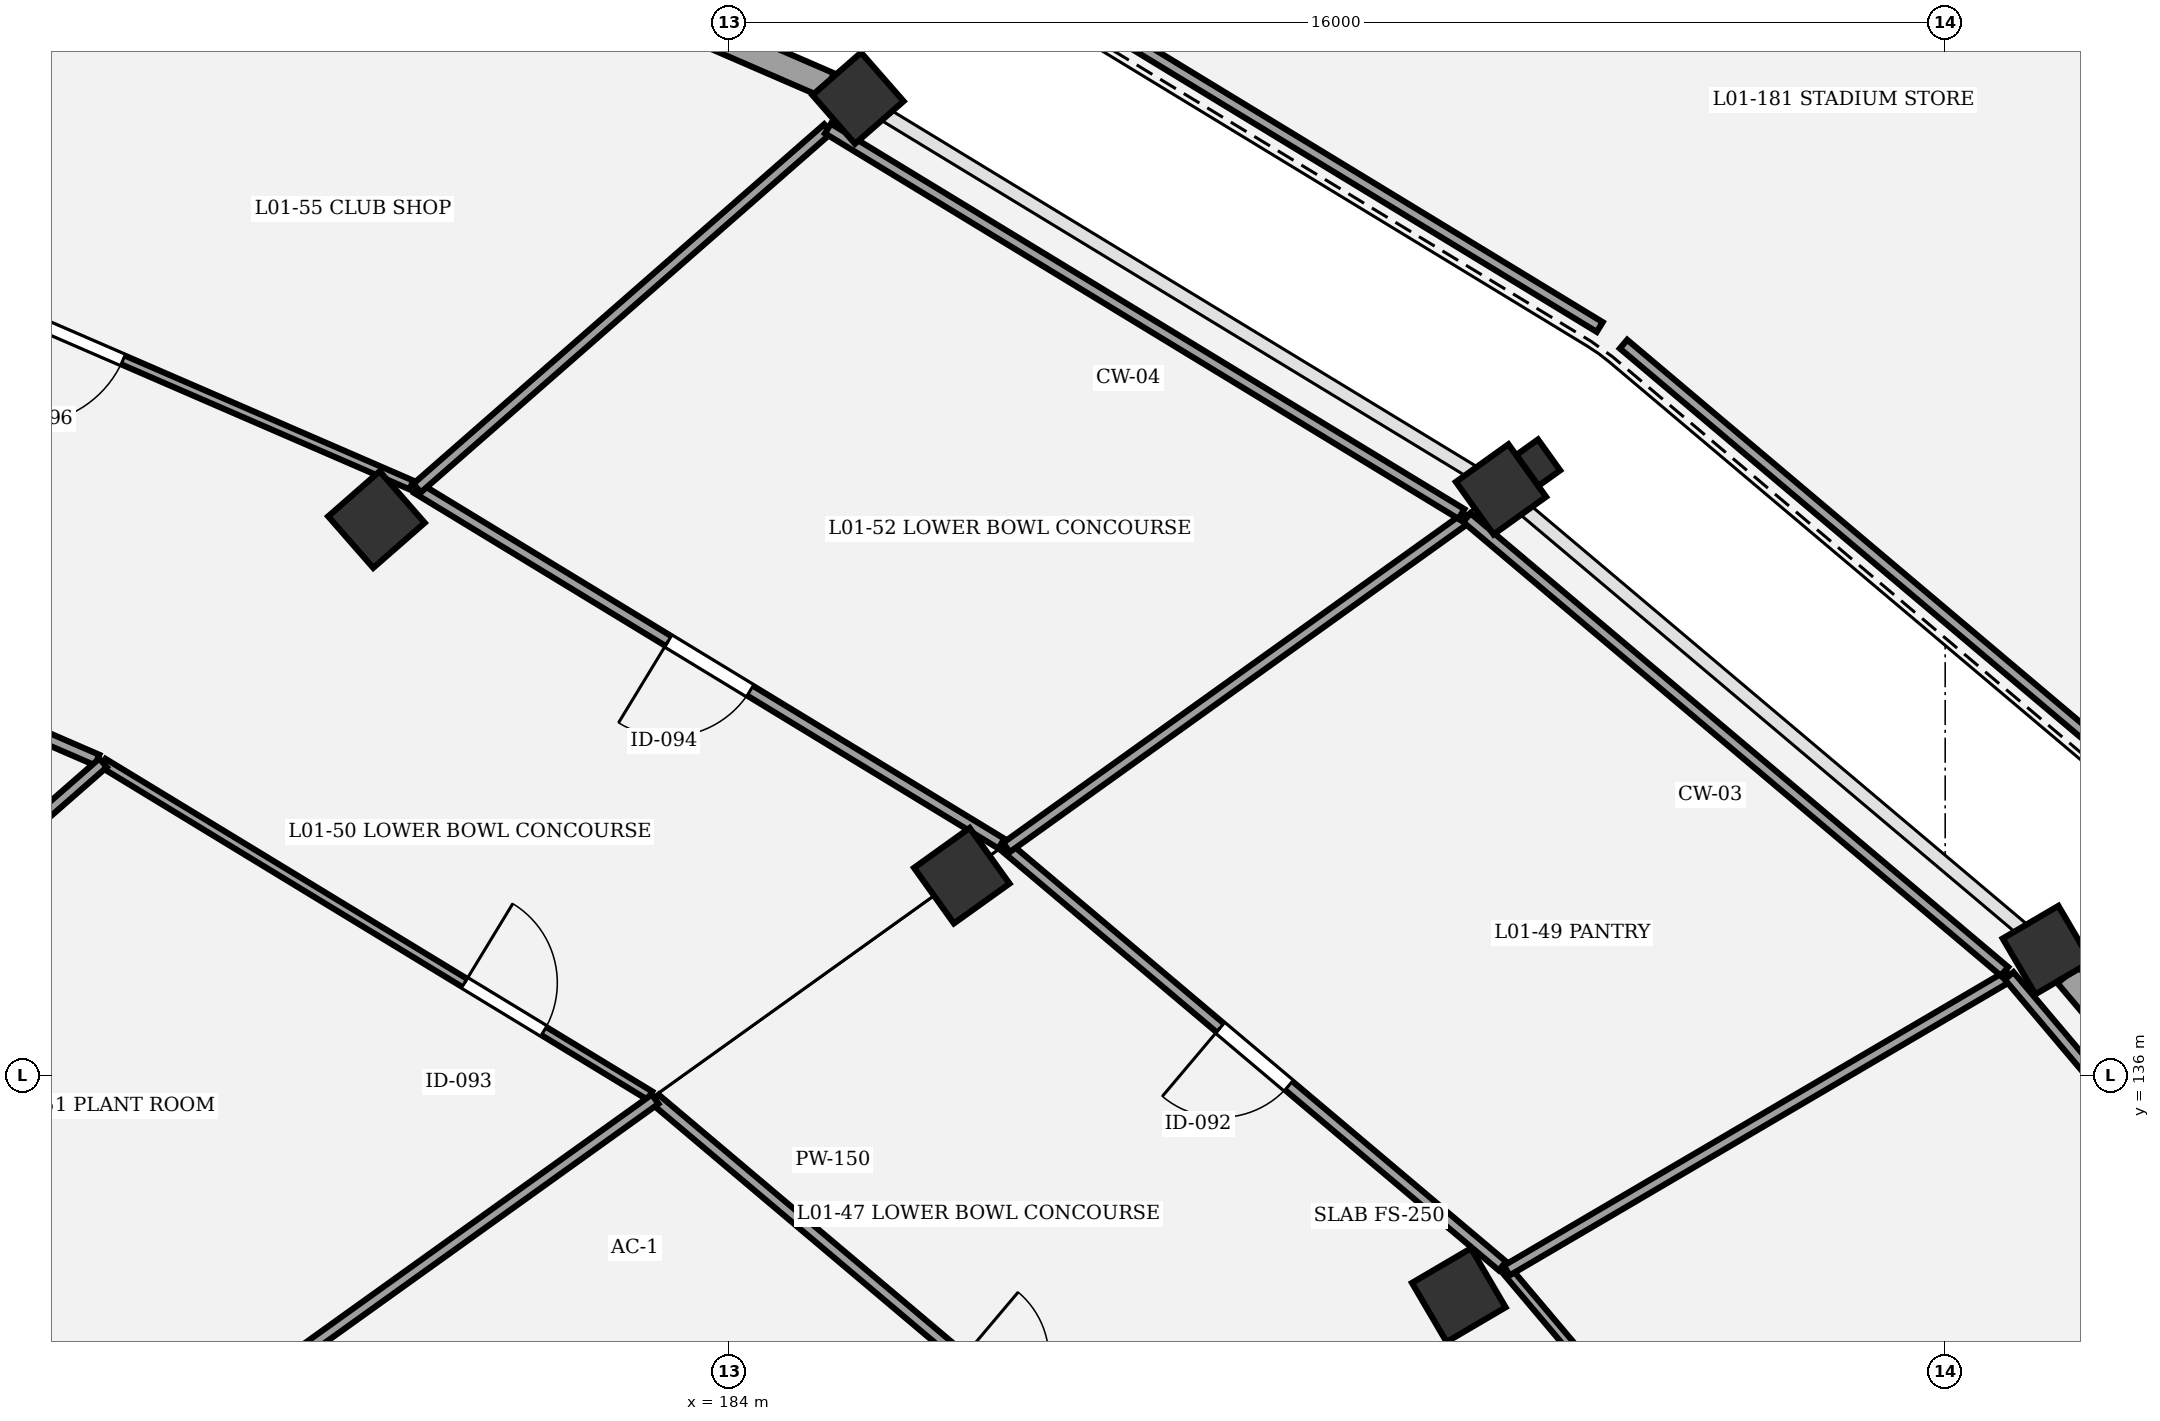
"""IFC4 building model, lengths in metres.
Left out: names, types, materials, properties, quantities, classifications, styles, units other than length and angle.
Written with IfcOpenShell. Run it as: python <this file> out.ifc"""

import sys

from ifc_helpers import new_model, si_unit, direction, frame, frame_2d, origin, origin_2d, place, context, subcontext, project, spatial, rectangle, extrude, element, fill, save


model = new_model("IFC4")
c1 = context("Model", 3, precision=1e-05, world=origin(), true_north=direction((0.0, 1.0)))
c2 = subcontext(c1, "Body", "Model", "MODEL_VIEW")
j1 = project(units=[si_unit("LENGTHUNIT", "METRE"), si_unit("PLANEANGLEUNIT", "RADIAN")], contexts=[c1])
p1 = place(None, origin())
s1 = spatial("IfcSite", under=j1, at=p1, CompositionType="ELEMENT")
p2 = place(p1, origin())
s2 = spatial("IfcBuilding", under=s1, at=p2, CompositionType="ELEMENT")
p3 = place(p2, frame((0.0, 0.0, 5.4)))
s3 = spatial("IfcBuildingStorey", under=s2, at=p3, CompositionType="ELEMENT", Elevation=5.4)
p4 = place(p3, frame((193.6, 133.114, 0.0), z_axis=(0.0, 0.0, 1.0), x_axis=(0.862513669207, 0.506033764121, 0.0)))
e1 = element("IfcColumn", 1, at=p4, inside=s3, PredefinedType="COLUMN", context=c2, shape_type="SweptSolid", body=[
    extrude(rectangle(XDim=0.9, YDim=0.9, at=origin_2d()), origin(), (0.0, 0.0, 1.0), 4.8),
])
p5 = place(p3, frame((201.338, 137.654, 0.0), z_axis=(0.0, 0.0, 1.0), x_axis=(0.862513669207, 0.506033764121, 0.0)))
e2 = element("IfcColumn", 2, at=p5, inside=s3, PredefinedType="COLUMN", context=c2, shape_type="SweptSolid", body=[
    extrude(rectangle(XDim=0.85, YDim=0.85, at=origin_2d()), origin(), (0.0, 0.0, 1.0), 4.8),
])
p6 = place(p3, frame((187.061, 138.632, 0.0), z_axis=(0.0, 0.0, 1.0), x_axis=(0.812897512265, 0.582406760395, 0.0)))
e3 = element("IfcColumn", 3, at=p6, inside=s3, PredefinedType="COLUMN", context=c2, shape_type="SweptSolid", body=[
    extrude(rectangle(XDim=0.9, YDim=0.9, at=origin_2d()), origin(), (0.0, 0.0, 1.0), 4.8),
])
p7 = place(p3, frame((194.156, 143.715, 0.0), z_axis=(0.0, 0.0, 1.0), x_axis=(0.812897512265, 0.582406760395, 0.0)))
e4 = element("IfcColumn", 4, at=p7, inside=s3, PredefinedType="COLUMN", context=c2, shape_type="SweptSolid", body=[
    extrude(rectangle(XDim=0.85, YDim=0.85, at=origin_2d()), origin(), (0.0, 0.0, 1.0), 4.8),
])
p8 = place(p3, frame((194.646, 144.066, 0.0), z_axis=(0.0, 0.0, 1.0), x_axis=(-0.582406760395, 0.812897512265, 0.0)))
e5 = element("IfcColumn", 5, at=p8, inside=s3, PredefinedType="PILASTER", context=c2, shape_type="SweptSolid", body=[
    extrude(rectangle(XDim=0.5, YDim=0.35, at=origin_2d()), origin(), (0.0, 0.0, 1.0), 4.8),
])
p9 = place(p3, frame((179.36, 143.317, 0.0), z_axis=(0.0, 0.0, 1.0), x_axis=(0.752529860433, 0.658558128912, 0.0)))
e6 = element("IfcColumn", 6, at=p9, inside=s3, PredefinedType="COLUMN", context=c2, shape_type="SweptSolid", body=[
    extrude(rectangle(XDim=0.9, YDim=0.9, at=origin_2d()), origin(), (0.0, 0.0, 1.0), 4.8),
])
p10 = place(p3, frame((185.696, 148.861, 0.0), z_axis=(0.0, 0.0, 1.0), x_axis=(0.752529860433, 0.658558128912, 0.0)))
e7 = element("IfcColumn", 7, at=p10, inside=s3, PredefinedType="COLUMN", context=c2, shape_type="SweptSolid", body=[
    extrude(rectangle(XDim=0.85, YDim=0.85, at=origin_2d()), origin(), (0.0, 0.0, 1.0), 4.8),
])
p11 = place(p3, frame((206.969, 130.985, 0.0), z_axis=(0.0, 0.0, 1.0), x_axis=(-0.645167090332, 0.764041507742, 0.0)))
e8 = element("IfcWall", 8, at=p11, inside=s3, PredefinedType="STANDARD", context=c2, shape_type="SweptSolid", body=[
    extrude(rectangle(XDim=8.305, YDim=0.35, at=frame_2d((4.153, 0.0))), origin(), (0.0, 0.0, 1.0), 3.57),
])
p12 = place(p11, frame((3.603, 0.0, 0.9)))
e9 = element("IfcOpeningElement", 9, at=p12, cuts=e8, PredefinedType="OPENING", context=c2, shape_type="SweptSolid", body=[
    extrude(rectangle(XDim=1.1, YDim=1.75, at=frame_2d((0.55, 0.875))), frame((0.0, 0.185, 0.0), z_axis=(0.0, -1.0, 0.0), x_axis=(1.0, 0.0, 0.0)), (0.0, 0.0, 1.0), 0.37),
])
p13 = place(p3, frame((176.326, 152.923, 0.0), z_axis=(0.0, 0.0, 1.0), x_axis=(0.91749374913, -0.397750198375, 0.0)))
e10 = element("IfcWall", 10, at=p13, inside=s3, PredefinedType="STANDARD", context=c2, shape_type="SweptSolid", body=[
    extrude(rectangle(XDim=9.79, YDim=0.35, at=frame_2d((4.895, 0.0))), origin(), (0.0, 0.0, 1.0), 3.57),
])
p14 = place(p13, frame((3.995, 0.0, 0.0)))
e11 = element("IfcOpeningElement", 11, at=p14, cuts=e10, PredefinedType="OPENING", context=c2, shape_type="SweptSolid", body=[
    extrude(rectangle(XDim=1.8, YDim=2.4, at=frame_2d((0.9, 1.2))), frame((0.0, 0.185, 0.0), z_axis=(0.0, -1.0, 0.0), x_axis=(1.0, 0.0, 0.0)), (0.0, 0.0, 1.0), 0.37),
])
p15 = place(p3, frame((199.595, 127.086, 0.0), z_axis=(0.0, 0.0, 1.0), x_axis=(-0.64516519871, 0.76404310505, 0.0)))
e12 = element("IfcWall", 12, at=p15, inside=s3, PredefinedType="PARTITIONING", context=c2, shape_type="SweptSolid", body=[
    extrude(rectangle(XDim=8.313, YDim=0.125, at=frame_2d((4.157, 0.0))), origin(), (0.0, 0.0, 1.0), 3.55),
])
p16 = place(p15, frame((3.607, 0.0, 0.0)))
e13 = element("IfcOpeningElement", 13, at=p16, cuts=e12, PredefinedType="OPENING", context=c2, shape_type="SweptSolid", body=[
    extrude(rectangle(XDim=1.1, YDim=2.2, at=frame_2d((0.55, 1.1))), frame((0.0, 0.073, 0.0), z_axis=(0.0, -1.0, 0.0), x_axis=(1.0, 0.0, 0.0)), (0.0, 0.0, 1.0), 0.145),
])
p17 = place(p3, frame((183.027, 135.692, 0.0), z_axis=(0.0, 0.0, 1.0), x_axis=(0.764249122867, -0.644921141068, 0.0)))
e14 = element("IfcWall", 14, at=p17, inside=s3, PredefinedType="PARTITIONING", context=c2, shape_type="SweptSolid", body=[
    extrude(rectangle(XDim=7.99, YDim=0.15, at=frame_2d((3.995, 0.0))), origin(), (0.0, 0.0, 1.0), 3.55),
])
p18 = place(p17, frame((5.288, 0.0, 0.0)))
e15 = element("IfcOpeningElement", 15, at=p18, cuts=e14, PredefinedType="OPENING", context=c2, shape_type="SweptSolid", body=[
    extrude(rectangle(XDim=1.14, YDim=2.2, at=frame_2d((0.57, 1.1))), frame((0.0, 0.085, 0.0), z_axis=(0.0, -1.0, 0.0), x_axis=(1.0, 0.0, 0.0)), (0.0, 0.0, 1.0), 0.17),
])
p19 = place(p3, frame((194.175, 133.497, 0.0), z_axis=(0.0, 0.0, 1.0), x_axis=(-0.764257572309, 0.644911128117, 0.0)))
e16 = element("IfcWall", 16, at=p19, inside=s3, PredefinedType="PARTITIONING", context=c2, shape_type="SweptSolid", body=[
    extrude(rectangle(XDim=8.539, YDim=0.15, at=frame_2d((4.269, 0.0))), origin(), (0.0, 0.0, 1.0), 3.55),
])
p20 = place(p19, frame((3.679, 0.0, 0.0)))
e17 = element("IfcOpeningElement", 17, at=p20, cuts=e16, PredefinedType="OPENING", context=c2, shape_type="SweptSolid", body=[
    extrude(rectangle(XDim=1.18, YDim=2.2, at=frame_2d((0.59, 1.1))), frame((0.0, 0.085, 0.0), z_axis=(0.0, -1.0, 0.0), x_axis=(1.0, 0.0, 0.0)), (0.0, 0.0, 1.0), 0.17),
])
p21 = place(p3, frame((175.763, 140.116, 0.0), z_axis=(0.0, 0.0, 1.0), x_axis=(0.854330104408, -0.519730769439, 0.0)))
e18 = element("IfcWall", 18, at=p21, inside=s3, PredefinedType="PARTITIONING", context=c2, shape_type="SweptSolid", body=[
    extrude(rectangle(XDim=8.42, YDim=0.125, at=frame_2d((4.21, 0.0))), origin(), (0.0, 0.0, 1.0), 3.55),
])
p22 = place(p21, frame((5.568, 0.0, 0.0)))
e19 = element("IfcOpeningElement", 19, at=p22, cuts=e18, PredefinedType="OPENING", context=c2, shape_type="SweptSolid", body=[
    extrude(rectangle(XDim=1.22, YDim=2.2, at=frame_2d((0.61, 1.1))), frame((0.0, 0.073, 0.0), z_axis=(0.0, -1.0, 0.0), x_axis=(1.0, 0.0, 0.0)), (0.0, 0.0, 1.0), 0.145),
])
p23 = place(p3, frame((187.582, 139.054, 0.0), z_axis=(0.0, 0.0, 1.0), x_axis=(-0.854321649351, 0.519744667554, 0.0)))
e20 = element("IfcWall", 20, at=p23, inside=s3, PredefinedType="PARTITIONING", context=c2, shape_type="SweptSolid", body=[
    extrude(rectangle(XDim=8.999, YDim=0.15, at=frame_2d((4.499, 0.0))), origin(), (0.0, 0.0, 1.0), 3.55),
])
p24 = place(p23, frame((3.869, 0.0, 0.0)))
e21 = element("IfcOpeningElement", 21, at=p24, cuts=e20, PredefinedType="OPENING", context=c2, shape_type="SweptSolid", body=[
    extrude(rectangle(XDim=1.26, YDim=2.2, at=frame_2d((0.63, 1.1))), frame((0.0, 0.085, 0.0), z_axis=(0.0, -1.0, 0.0), x_axis=(1.0, 0.0, 0.0)), (0.0, 0.0, 1.0), 0.17),
])
p25 = place(p3, frame((167.382, 143.753, 0.0), z_axis=(0.0, 0.0, 1.0), x_axis=(0.917494590455, -0.397748257677, 0.0)))
e22 = element("IfcWall", 22, at=p25, inside=s3, PredefinedType="PARTITIONING", context=c2, shape_type="SweptSolid", body=[
    extrude(rectangle(XDim=9.049, YDim=0.15, at=frame_2d((4.525, 0.0))), origin(), (0.0, 0.0, 1.0), 3.55),
])
p26 = place(p25, frame((5.991, 0.0, 0.0)))
e23 = element("IfcOpeningElement", 23, at=p26, cuts=e22, PredefinedType="OPENING", context=c2, shape_type="SweptSolid", body=[
    extrude(rectangle(XDim=1.32, YDim=2.2, at=frame_2d((0.66, 1.1))), frame((0.0, 0.085, 0.0), z_axis=(0.0, -1.0, 0.0), x_axis=(1.0, 0.0, 0.0)), (0.0, 0.0, 1.0), 0.17),
])
p27 = place(p3, frame((179.82, 143.772, 0.0), z_axis=(0.0, 0.0, 1.0), x_axis=(-0.917508957037, 0.39771511633, 0.0)))
e24 = element("IfcWall", 24, at=p27, inside=s3, PredefinedType="PARTITIONING", context=c2, shape_type="SweptSolid", body=[
    extrude(rectangle(XDim=9.671, YDim=0.125, at=frame_2d((4.836, 0.0))), origin(), (0.0, 0.0, 1.0), 3.55),
])
p28 = place(p27, frame((4.136, 0.0, 0.0)))
e25 = element("IfcOpeningElement", 25, at=p28, cuts=e24, PredefinedType="OPENING", context=c2, shape_type="SweptSolid", body=[
    extrude(rectangle(XDim=1.4, YDim=2.2, at=frame_2d((0.7, 1.1))), frame((0.0, 0.073, 0.0), z_axis=(0.0, -1.0, 0.0), x_axis=(1.0, 0.0, 0.0)), (0.0, 0.0, 1.0), 0.145),
])
p29 = place(p3, frame((194.232, 133.438, 0.0), z_axis=(0.0, 0.0, 1.0), x_axis=(0.862520085009, 0.506022828492, 0.0)))
e26 = element("IfcWall", 26, at=p29, inside=s3, PredefinedType="PARTITIONING", context=c2, shape_type="SweptSolid", body=[
    extrude(rectangle(XDim=7.663, YDim=0.15, at=frame_2d((3.831, 0.0))), origin(), (0.0, 0.0, 1.0), 3.55),
])
p30 = place(p3, frame((200.841, 137.315, 0.0), z_axis=(0.0, 0.0, 1.0), x_axis=(0.645166061073, -0.764042376861, 0.0)))
e27 = element("IfcWall", 27, at=p30, inside=s3, PredefinedType="PARTITIONING", context=c2, shape_type="SweptSolid", body=[
    extrude(rectangle(XDim=9.014, YDim=0.15, at=frame_2d((4.507, 0.0))), origin(), (0.0, 0.0, 1.0), 3.55),
])
p31 = place(p3, frame((176.0, 130.657, 0.0), z_axis=(0.0, 0.0, 1.0), x_axis=(0.812881530735, 0.582429066058, 0.0)))
e28 = element("IfcWall", 28, at=p31, inside=s3, PredefinedType="PARTITIONING", context=c2, shape_type="SweptSolid", body=[
    extrude(rectangle(XDim=8.645, YDim=0.15, at=frame_2d((4.322, 0.0))), origin(), (0.0, 0.0, 1.0), 3.55),
])
p32 = place(p3, frame((187.649, 139.004, 0.0), z_axis=(0.0, 0.0, 1.0), x_axis=(0.812884613266, 0.582424763824, 0.0)))
e29 = element("IfcWall", 29, at=p32, inside=s3, PredefinedType="PARTITIONING", context=c2, shape_type="SweptSolid", body=[
    extrude(rectangle(XDim=7.45, YDim=0.15, at=frame_2d((3.725, 0.0))), origin(), (0.0, 0.0, 1.0), 3.55),
])
p33 = place(p3, frame((193.706, 143.343, 0.0), z_axis=(0.0, 0.0, 1.0), x_axis=(0.764252893528, -0.644916672706, 0.0)))
e30 = element("IfcWall", 30, at=p33, inside=s3, PredefinedType="PARTITIONING", context=c2, shape_type="SweptSolid", body=[
    extrude(rectangle(XDim=9.257, YDim=0.15, at=frame_2d((4.629, 0.0))), origin(), (0.0, 0.0, 1.0), 3.55),
])
p34 = place(p3, frame((175.933, 130.708, 0.0), z_axis=(0.0, 0.0, 1.0), x_axis=(-0.854343551339, 0.519708664817, 0.0)))
e31 = element("IfcWall", 31, at=p34, inside=s3, PredefinedType="PARTITIONING", context=c2, shape_type="SweptSolid", body=[
    extrude(rectangle(XDim=7.542, YDim=0.15, at=frame_2d((3.771, 0.0))), origin(), (0.0, 0.0, 1.0), 3.55),
])
p35 = place(p3, frame((169.49, 134.627, 0.0), z_axis=(0.0, 0.0, 1.0), x_axis=(0.752565808221, 0.658517049359, 0.0)))
e32 = element("IfcWall", 32, at=p35, inside=s3, PredefinedType="PARTITIONING", context=c2, shape_type="SweptSolid", body=[
    extrude(rectangle(XDim=8.335, YDim=0.15, at=frame_2d((4.168, 0.0))), origin(), (0.0, 0.0, 1.0), 3.55),
])
p36 = place(p3, frame((179.895, 143.731, 0.0), z_axis=(0.0, 0.0, 1.0), x_axis=(0.752564061831, 0.658519045162, 0.0)))
e33 = element("IfcWall", 33, at=p36, inside=s3, PredefinedType="PARTITIONING", context=c2, shape_type="SweptSolid", body=[
    extrude(rectangle(XDim=7.183, YDim=0.15, at=frame_2d((3.592, 0.0))), origin(), (0.0, 0.0, 1.0), 3.55),
])
p37 = place(p3, frame((185.3, 148.461, 0.0), z_axis=(0.0, 0.0, 1.0), x_axis=(0.854323689683, -0.519741313777, 0.0)))
e34 = element("IfcWall", 34, at=p37, inside=s3, PredefinedType="PARTITIONING", context=c2, shape_type="SweptSolid", body=[
    extrude(rectangle(XDim=9.756, YDim=0.15, at=frame_2d((4.878, 0.0))), origin(), (0.0, 0.0, 1.0), 3.55),
])
p38 = place(p3, frame((172.286, 149.072, 0.0), z_axis=(0.0, 0.0, 1.0), x_axis=(0.67785928919, 0.735191664846, 0.0)))
e35 = element("IfcWall", 35, at=p38, inside=s3, PredefinedType="PARTITIONING", context=c2, shape_type="SweptSolid", body=[
    extrude(rectangle(XDim=4.893, YDim=0.15, at=frame_2d((2.446, 0.0))), origin(), (0.0, 0.0, 1.0), 3.55),
])
p39 = place(p3, frame((195.455, 145.85, 0.0), z_axis=(0.0, 0.0, 1.0), x_axis=(-0.854333268174, 0.519725568826, 0.0)))
e36 = element("IfcWall", 36, at=p39, inside=s3, PredefinedType="PARTITIONING", context=c2, shape_type="SweptSolid", body=[
    extrude(rectangle(XDim=9.902, YDim=0.15, at=frame_2d((4.951, 0.0))), origin(), (0.0, 0.0, 1.0), 3.55),
])
p40 = place(p3, frame((202.9, 139.607, 0.0), z_axis=(0.0, 0.0, 1.0), x_axis=(-0.764245949545, 0.644924901523, 0.0)))
e37 = element("IfcWall", 37, at=p40, inside=s3, PredefinedType="PARTITIONING", context=c2, shape_type="SweptSolid", body=[
    extrude(rectangle(XDim=9.332, YDim=0.15, at=frame_2d((4.666, 0.0))), origin(), (0.0, 0.0, 1.0), 3.55),
])
p41 = place(p20, origin())
e38 = element("IfcDoor", 38, at=p41, inside=s3, OperationType="SINGLE_SWING_RIGHT", PredefinedType="DOOR", context=c2, shape_type="SweptSolid", body=[
    extrude(rectangle(XDim=1.18, YDim=2.2, at=frame_2d((0.59, 1.1))), frame((0.0, 0.025, 0.0), z_axis=(0.0, -1.0, 0.0), x_axis=(1.0, 0.0, 0.0)), (0.0, 0.0, 1.0), 0.05),
])
fill(e17, e38)
p42 = place(p22, origin())
e39 = element("IfcDoor", 39, at=p42, inside=s3, OperationType="SINGLE_SWING_LEFT", PredefinedType="DOOR", context=c2, shape_type="SweptSolid", body=[
    extrude(rectangle(XDim=1.22, YDim=2.2, at=frame_2d((0.61, 1.1))), frame((0.0, 0.025, 0.0), z_axis=(0.0, -1.0, 0.0), x_axis=(1.0, 0.0, 0.0)), (0.0, 0.0, 1.0), 0.05),
])
fill(e19, e39)
p43 = place(p24, origin())
e40 = element("IfcDoor", 40, at=p43, inside=s3, OperationType="SINGLE_SWING_RIGHT", PredefinedType="DOOR", context=c2, shape_type="SweptSolid", body=[
    extrude(rectangle(XDim=1.26, YDim=2.2, at=frame_2d((0.63, 1.1))), frame((0.0, 0.025, 0.0), z_axis=(0.0, -1.0, 0.0), x_axis=(1.0, 0.0, 0.0)), (0.0, 0.0, 1.0), 0.05),
])
fill(e21, e40)
p44 = place(p28, origin())
e41 = element("IfcDoor", 41, at=p44, inside=s3, OperationType="SINGLE_SWING_RIGHT", PredefinedType="DOOR", context=c2, shape_type="SweptSolid", body=[
    extrude(rectangle(XDim=1.4, YDim=2.2, at=frame_2d((0.7, 1.1))), frame((0.0, 0.025, 0.0), z_axis=(0.0, -1.0, 0.0), x_axis=(1.0, 0.0, 0.0)), (0.0, 0.0, 1.0), 0.05),
])
fill(e25, e41)
save(model, sys.argv[1])
